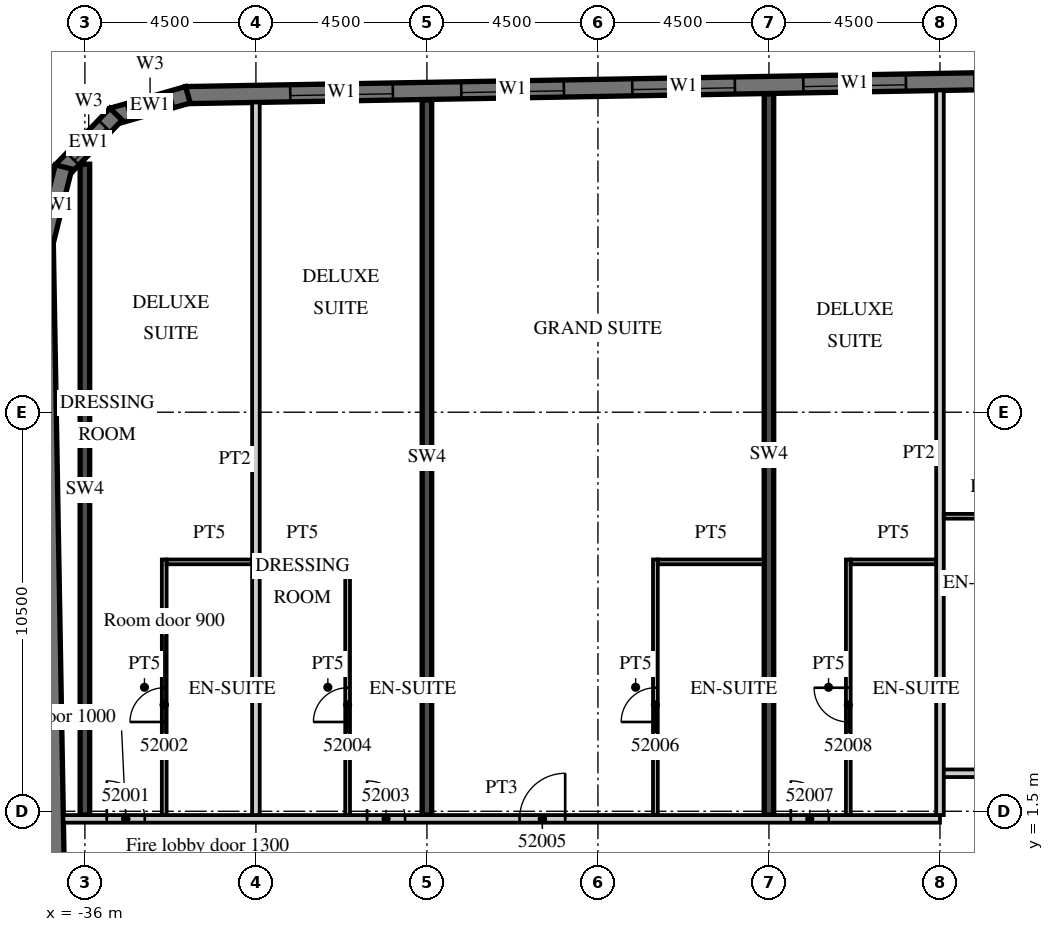
"""IFC4 building model, lengths in metres.
Left out: names, types, materials, properties, quantities, classifications, styles, units other than length and angle.
Written with IfcOpenShell. Run it as: python <this file> out.ifc"""

import sys

from ifc_helpers import new_model, si_unit, direction, frame, frame_2d, origin, place, context, subcontext, project, spatial, polyline, rectangle, outline, extrude, element, fill, save


model = new_model("IFC4")
c1 = context("Model", 3, precision=1e-05, world=origin(), true_north=direction((0.0, 1.0)))
c2 = subcontext(c1, "Body", "Model", "MODEL_VIEW")
j1 = project(units=[si_unit("LENGTHUNIT", "METRE"), si_unit("PLANEANGLEUNIT", "RADIAN")], contexts=[c1])
p1 = place(None, origin())
s1 = spatial("IfcSite", under=j1, at=p1, CompositionType="ELEMENT")
p2 = place(p1, origin())
s2 = spatial("IfcBuilding", under=s1, at=p2, CompositionType="ELEMENT")
p3 = place(p2, frame((0.0, 0.0, 217.7)))
s3 = spatial("IfcBuildingStorey", under=s2, at=p3, CompositionType="ELEMENT", Elevation=217.7)
p4 = place(p3, frame((-36.0, 1.4, 0.0), z_axis=(0.0, 0.0, 1.0), x_axis=(0.0, 1.0, 0.0)))
e1 = element("IfcWall", 1, at=p4, inside=s3, PredefinedType="SHEAR", context=c2, shape_type="SweptSolid", body=[
    extrude(rectangle(XDim=17.125, YDim=0.25, at=frame_2d((8.563, 0.0))), origin(), (0.0, 0.0, 1.0), 3.3),
])
p5 = place(p3, frame((-27.0, 1.4, 0.0), z_axis=(0.0, 0.0, 1.0), x_axis=(0.0, 1.0, 0.0)))
e2 = element("IfcWall", 2, at=p5, inside=s3, PredefinedType="SHEAR", context=c2, shape_type="SweptSolid", body=[
    extrude(rectangle(XDim=18.817, YDim=0.25, at=frame_2d((9.409, 0.0))), origin(), (0.0, 0.0, 1.0), 3.3),
])
p6 = place(p3, frame((-18.0, 1.4, 0.0), z_axis=(0.0, 0.0, 1.0), x_axis=(0.0, 1.0, 0.0)))
e3 = element("IfcWall", 3, at=p6, inside=s3, PredefinedType="SHEAR", context=c2, shape_type="SweptSolid", body=[
    extrude(rectangle(XDim=18.974, YDim=0.25, at=frame_2d((9.487, 0.0))), origin(), (0.0, 0.0, 1.0), 3.3),
])
p7 = place(p3, frame((-37.057, 16.503, 0.0), z_axis=(0.0, 0.0, 1.0), x_axis=(0.017452279857, -0.999847697366, 0.0)))
e4 = element("IfcWall", 4, at=p7, inside=s3, PredefinedType="SOLIDWALL", context=c2, shape_type="SweptSolid", body=[
    extrude(rectangle(XDim=33.0, YDim=0.45, at=frame_2d((16.5, 0.0))), origin(), (0.0, 0.0, 1.0), 3.02),
])
p8 = place(p3, frame((13.504, 21.161, 0.0), z_axis=(0.0, 0.0, 1.0), x_axis=(-0.999847763257, -0.017448504532, 0.0)))
e5 = element("IfcWall", 5, at=p8, inside=s3, PredefinedType="SOLIDWALL", context=c2, shape_type="SweptSolid", body=[
    extrude(rectangle(XDim=46.859, YDim=0.45, at=frame_2d((23.43, 0.0))), origin(), (0.0, 0.0, 1.0), 3.02),
])
p9 = place(p8, frame((0.9, 0.0, 0.45)))
e6 = element("IfcOpeningElement", 6, at=p9, cuts=e5, PredefinedType="OPENING", context=c2, shape_type="SweptSolid", body=[
    extrude(rectangle(XDim=2.7, YDim=2.25, at=frame_2d((1.35, 1.125))), frame((0.0, 0.235, 0.0), z_axis=(0.0, -1.0, 0.0), x_axis=(1.0, 0.0, 0.0)), (0.0, 0.0, 1.0), 0.47),
])
p10 = place(p8, frame((5.401, 0.0, 0.45)))
e7 = element("IfcOpeningElement", 7, at=p10, cuts=e5, PredefinedType="OPENING", context=c2, shape_type="SweptSolid", body=[
    extrude(rectangle(XDim=2.7, YDim=2.25, at=frame_2d((1.35, 1.125))), frame((0.0, 0.235, 0.0), z_axis=(0.0, -1.0, 0.0), x_axis=(1.0, 0.0, 0.0)), (0.0, 0.0, 1.0), 0.47),
])
p11 = place(p8, frame((9.902, 0.0, 0.45)))
e8 = element("IfcOpeningElement", 8, at=p11, cuts=e5, PredefinedType="OPENING", context=c2, shape_type="SweptSolid", body=[
    extrude(rectangle(XDim=2.7, YDim=2.25, at=frame_2d((1.35, 1.125))), frame((0.0, 0.235, 0.0), z_axis=(0.0, -1.0, 0.0), x_axis=(1.0, 0.0, 0.0)), (0.0, 0.0, 1.0), 0.47),
])
p12 = place(p8, frame((14.402, 0.0, 0.45)))
e9 = element("IfcOpeningElement", 9, at=p12, cuts=e5, PredefinedType="OPENING", context=c2, shape_type="SweptSolid", body=[
    extrude(rectangle(XDim=2.7, YDim=2.25, at=frame_2d((1.35, 1.125))), frame((0.0, 0.235, 0.0), z_axis=(0.0, -1.0, 0.0), x_axis=(1.0, 0.0, 0.0)), (0.0, 0.0, 1.0), 0.47),
])
p13 = place(p8, frame((18.903, 0.0, 0.45)))
e10 = element("IfcOpeningElement", 10, at=p13, cuts=e5, PredefinedType="OPENING", context=c2, shape_type="SweptSolid", body=[
    extrude(rectangle(XDim=2.7, YDim=2.25, at=frame_2d((1.35, 1.125))), frame((0.0, 0.235, 0.0), z_axis=(0.0, -1.0, 0.0), x_axis=(1.0, 0.0, 0.0)), (0.0, 0.0, 1.0), 0.47),
])
p14 = place(p8, frame((23.404, 0.0, 0.45)))
e11 = element("IfcOpeningElement", 11, at=p14, cuts=e5, PredefinedType="OPENING", context=c2, shape_type="SweptSolid", body=[
    extrude(rectangle(XDim=2.7, YDim=2.25, at=frame_2d((1.35, 1.125))), frame((0.0, 0.235, 0.0), z_axis=(0.0, -1.0, 0.0), x_axis=(1.0, 0.0, 0.0)), (0.0, 0.0, 1.0), 0.47),
])
p15 = place(p8, frame((27.904, 0.0, 0.45)))
e12 = element("IfcOpeningElement", 12, at=p15, cuts=e5, PredefinedType="OPENING", context=c2, shape_type="SweptSolid", body=[
    extrude(rectangle(XDim=2.7, YDim=2.25, at=frame_2d((1.35, 1.125))), frame((0.0, 0.235, 0.0), z_axis=(0.0, -1.0, 0.0), x_axis=(1.0, 0.0, 0.0)), (0.0, 0.0, 1.0), 0.47),
])
p16 = place(p8, frame((32.405, 0.0, 0.45)))
e13 = element("IfcOpeningElement", 13, at=p16, cuts=e5, PredefinedType="OPENING", context=c2, shape_type="SweptSolid", body=[
    extrude(rectangle(XDim=2.7, YDim=2.25, at=frame_2d((1.35, 1.125))), frame((0.0, 0.235, 0.0), z_axis=(0.0, -1.0, 0.0), x_axis=(1.0, 0.0, 0.0)), (0.0, 0.0, 1.0), 0.47),
])
p17 = place(p8, frame((36.906, 0.0, 0.45)))
e14 = element("IfcOpeningElement", 14, at=p17, cuts=e5, PredefinedType="OPENING", context=c2, shape_type="SweptSolid", body=[
    extrude(rectangle(XDim=2.7, YDim=2.25, at=frame_2d((1.35, 1.125))), frame((0.0, 0.235, 0.0), z_axis=(0.0, -1.0, 0.0), x_axis=(1.0, 0.0, 0.0)), (0.0, 0.0, 1.0), 0.47),
])
p18 = place(p8, frame((41.406, 0.0, 0.45)))
e15 = element("IfcOpeningElement", 15, at=p18, cuts=e5, PredefinedType="OPENING", context=c2, shape_type="SweptSolid", body=[
    extrude(rectangle(XDim=2.7, YDim=2.25, at=frame_2d((1.35, 1.125))), frame((0.0, 0.235, 0.0), z_axis=(0.0, -1.0, 0.0), x_axis=(1.0, 0.0, 0.0)), (0.0, 0.0, 1.0), 0.47),
])
p19 = place(p3, frame((-33.29, 20.352, 0.0), z_axis=(0.0, 0.0, 1.0), x_axis=(-0.961247584925, -0.275686562016, 0.0)))
e16 = element("IfcWall", 16, at=p19, inside=s3, PredefinedType="SOLIDWALL", context=c2, shape_type="SweptSolid", body=[
    extrude(outline(polyline([(0.0, -0.225), (2.071, -0.225), (1.95, 0.225), (0.121, 0.225), (0.0, -0.225)])), origin(), (0.0, 0.0, 1.0), 3.02),
])
p20 = place(p19, frame((0.435, 0.0, 0.45)))
e17 = element("IfcOpeningElement", 17, at=p20, cuts=e16, PredefinedType="OPENING", context=c2, shape_type="SweptSolid", body=[
    extrude(rectangle(XDim=1.2, YDim=2.25, at=frame_2d((0.6, 1.125))), frame((0.0, 0.235, 0.0), z_axis=(0.0, -1.0, 0.0), x_axis=(1.0, 0.0, 0.0)), (0.0, 0.0, 1.0), 0.47),
])
p21 = place(p3, frame((-35.181, 19.842, 0.0), z_axis=(0.0, 0.0, 1.0), x_axis=(-0.694678672846, -0.719320193998, 0.0)))
e18 = element("IfcWall", 18, at=p21, inside=s3, PredefinedType="SOLIDWALL", context=c2, shape_type="SweptSolid", body=[
    extrude(outline(polyline([(0.0, -0.225), (2.071, -0.225), (1.95, 0.225), (0.121, 0.225), (0.0, -0.225)])), origin(), (0.0, 0.0, 1.0), 3.02),
])
p22 = place(p21, frame((0.435, 0.0, 0.45)))
e19 = element("IfcOpeningElement", 19, at=p22, cuts=e18, PredefinedType="OPENING", context=c2, shape_type="SweptSolid", body=[
    extrude(rectangle(XDim=1.2, YDim=2.25, at=frame_2d((0.6, 1.125))), frame((0.0, 0.235, 0.0), z_axis=(0.0, -1.0, 0.0), x_axis=(1.0, 0.0, 0.0)), (0.0, 0.0, 1.0), 0.47),
])
p23 = place(p3, frame((-36.563, 18.454, 0.0), z_axis=(0.0, 0.0, 1.0), x_axis=(-0.241869623482, -0.970308757683, 0.0)))
e20 = element("IfcWall", 20, at=p23, inside=s3, PredefinedType="SOLIDWALL", context=c2, shape_type="SweptSolid", body=[
    extrude(outline(polyline([(-0.0, -0.225), (2.07, -0.225), (1.95, 0.225), (0.12, 0.225), (-0.0, -0.225)])), origin(), (0.0, 0.0, 1.0), 3.02),
])
p24 = place(p3, frame((-36.566, 1.3, 0.0), z_axis=(0.0, 0.0, 1.0), x_axis=(1.0, 0.0, 0.0)))
e21 = element("IfcWall", 21, at=p24, inside=s3, PredefinedType="PARTITIONING", context=c2, shape_type="SweptSolid", body=[
    extrude(rectangle(XDim=23.066, YDim=0.2, at=frame_2d((11.533, 0.0))), origin(), (0.0, 0.0, 1.0), 3.02),
])
p25 = place(p24, frame((1.141, 0.0, 0.0)))
e22 = element("IfcOpeningElement", 22, at=p25, cuts=e21, PredefinedType="OPENING", context=c2, shape_type="SweptSolid", body=[
    extrude(rectangle(XDim=1.0, YDim=2.1, at=frame_2d((0.5, 1.05))), frame((0.0, 0.11, 0.0), z_axis=(0.0, -1.0, 0.0), x_axis=(1.0, 0.0, 0.0)), (0.0, 0.0, 1.0), 0.22),
])
p26 = place(p24, frame((7.991, 0.0, 0.0)))
e23 = element("IfcOpeningElement", 23, at=p26, cuts=e21, PredefinedType="OPENING", context=c2, shape_type="SweptSolid", body=[
    extrude(rectangle(XDim=1.0, YDim=2.1, at=frame_2d((0.5, 1.05))), frame((0.0, 0.11, 0.0), z_axis=(0.0, -1.0, 0.0), x_axis=(1.0, 0.0, 0.0)), (0.0, 0.0, 1.0), 0.22),
])
p27 = place(p24, frame((12.004, 0.0, 0.0)))
e24 = element("IfcOpeningElement", 24, at=p27, cuts=e21, PredefinedType="OPENING", context=c2, shape_type="SweptSolid", body=[
    extrude(rectangle(XDim=1.2, YDim=2.1, at=frame_2d((0.6, 1.05))), frame((0.0, 0.11, 0.0), z_axis=(0.0, -1.0, 0.0), x_axis=(1.0, 0.0, 0.0)), (0.0, 0.0, 1.0), 0.22),
])
p28 = place(p24, frame((19.141, 0.0, 0.0)))
e25 = element("IfcOpeningElement", 25, at=p28, cuts=e21, PredefinedType="OPENING", context=c2, shape_type="SweptSolid", body=[
    extrude(rectangle(XDim=1.0, YDim=2.1, at=frame_2d((0.5, 1.05))), frame((0.0, 0.11, 0.0), z_axis=(0.0, -1.0, 0.0), x_axis=(1.0, 0.0, 0.0)), (0.0, 0.0, 1.0), 0.22),
])
p29 = place(p3, frame((-13.5, 2.5, 0.0), z_axis=(0.0, 0.0, 1.0), x_axis=(1.0, 0.0, 0.0)))
e26 = element("IfcWall", 26, at=p29, inside=s3, PredefinedType="PARTITIONING", context=c2, shape_type="SweptSolid", body=[
    extrude(rectangle(XDim=27.0, YDim=0.2, at=frame_2d((13.5, 0.0))), origin(), (0.0, 0.0, 1.0), 3.02),
])
p30 = place(p29, frame((2.925, 0.0, 0.0)))
e27 = element("IfcOpeningElement", 27, at=p30, cuts=e26, PredefinedType="OPENING", context=c2, shape_type="SweptSolid", body=[
    extrude(rectangle(XDim=1.0, YDim=2.1, at=frame_2d((0.5, 1.05))), frame((0.0, 0.11, 0.0), z_axis=(0.0, -1.0, 0.0), x_axis=(1.0, 0.0, 0.0)), (0.0, 0.0, 1.0), 0.22),
])
p31 = place(p29, frame((7.45, 0.0, 0.0)))
e28 = element("IfcOpeningElement", 28, at=p31, cuts=e26, PredefinedType="OPENING", context=c2, shape_type="SweptSolid", body=[
    extrude(rectangle(XDim=1.0, YDim=2.1, at=frame_2d((0.5, 1.05))), frame((0.0, 0.11, 0.0), z_axis=(0.0, -1.0, 0.0), x_axis=(1.0, 0.0, 0.0)), (0.0, 0.0, 1.0), 0.22),
])
p32 = place(p29, frame((11.925, 0.0, 0.0)))
e29 = element("IfcOpeningElement", 29, at=p32, cuts=e26, PredefinedType="OPENING", context=c2, shape_type="SweptSolid", body=[
    extrude(rectangle(XDim=1.0, YDim=2.1, at=frame_2d((0.5, 1.05))), frame((0.0, 0.11, 0.0), z_axis=(0.0, -1.0, 0.0), x_axis=(1.0, 0.0, 0.0)), (0.0, 0.0, 1.0), 0.22),
])
p33 = place(p29, frame((14.075, 0.0, 0.0)))
e30 = element("IfcOpeningElement", 30, at=p33, cuts=e26, PredefinedType="OPENING", context=c2, shape_type="SweptSolid", body=[
    extrude(rectangle(XDim=1.0, YDim=2.1, at=frame_2d((0.5, 1.05))), frame((0.0, 0.11, 0.0), z_axis=(0.0, -1.0, 0.0), x_axis=(1.0, 0.0, 0.0)), (0.0, 0.0, 1.0), 0.22),
])
p34 = place(p29, frame((20.925, 0.0, 0.0)))
e31 = element("IfcOpeningElement", 31, at=p34, cuts=e26, PredefinedType="OPENING", context=c2, shape_type="SweptSolid", body=[
    extrude(rectangle(XDim=1.0, YDim=2.1, at=frame_2d((0.5, 1.05))), frame((0.0, 0.11, 0.0), z_axis=(0.0, -1.0, 0.0), x_axis=(1.0, 0.0, 0.0)), (0.0, 0.0, 1.0), 0.22),
])
p35 = place(p29, frame((25.425, 0.0, 0.0)))
e32 = element("IfcOpeningElement", 32, at=p35, cuts=e26, PredefinedType="OPENING", context=c2, shape_type="SweptSolid", body=[
    extrude(rectangle(XDim=1.0, YDim=2.1, at=frame_2d((0.5, 1.05))), frame((0.0, 0.11, 0.0), z_axis=(0.0, -1.0, 0.0), x_axis=(1.0, 0.0, 0.0)), (0.0, 0.0, 1.0), 0.22),
])
p36 = place(p3, frame((-31.5, 1.4, 0.0), z_axis=(0.0, 0.0, 1.0), x_axis=(0.0, 1.0, 0.0)))
e33 = element("IfcWall", 33, at=p36, inside=s3, PredefinedType="PARTITIONING", context=c2, shape_type="SweptSolid", body=[
    extrude(rectangle(XDim=18.751, YDim=0.2, at=frame_2d((9.375, 0.0))), origin(), (0.0, 0.0, 1.0), 3.02),
])
p37 = place(p3, frame((-33.913, 1.4, 0.0), z_axis=(0.0, 0.0, 1.0), x_axis=(0.0, 1.0, 0.0)))
e34 = element("IfcWall", 34, at=p37, inside=s3, PredefinedType="PARTITIONING", context=c2, shape_type="SweptSolid", body=[
    extrude(rectangle(XDim=6.725, YDim=0.125, at=frame_2d((3.363, 0.0))), origin(), (0.0, 0.0, 1.0), 3.02),
])
p38 = place(p37, frame((2.45, 0.0, 0.0)))
e35 = element("IfcOpeningElement", 35, at=p38, cuts=e34, PredefinedType="OPENING", context=c2, shape_type="SweptSolid", body=[
    extrude(rectangle(XDim=0.9, YDim=2.1, at=frame_2d((0.45, 1.05))), frame((0.0, 0.073, 0.0), z_axis=(0.0, -1.0, 0.0), x_axis=(1.0, 0.0, 0.0)), (0.0, 0.0, 1.0), 0.145),
])
p39 = place(p3, frame((-33.85, 8.062, 0.0), z_axis=(0.0, 0.0, 1.0), x_axis=(1.0, 0.0, 0.0)))
e36 = element("IfcWall", 36, at=p39, inside=s3, PredefinedType="PARTITIONING", context=c2, shape_type="SweptSolid", body=[
    extrude(rectangle(XDim=2.25, YDim=0.125, at=frame_2d((1.125, 0.0))), origin(), (0.0, 0.0, 1.0), 3.02),
])
p40 = place(p3, frame((-29.087, 1.4, 0.0), z_axis=(0.0, 0.0, 1.0), x_axis=(0.0, 1.0, 0.0)))
e37 = element("IfcWall", 37, at=p40, inside=s3, PredefinedType="PARTITIONING", context=c2, shape_type="SweptSolid", body=[
    extrude(rectangle(XDim=6.725, YDim=0.125, at=frame_2d((3.363, 0.0))), origin(), (0.0, 0.0, 1.0), 3.02),
])
p41 = place(p40, frame((2.45, 0.0, 0.0)))
e38 = element("IfcOpeningElement", 38, at=p41, cuts=e37, PredefinedType="OPENING", context=c2, shape_type="SweptSolid", body=[
    extrude(rectangle(XDim=0.9, YDim=2.1, at=frame_2d((0.45, 1.05))), frame((0.0, 0.073, 0.0), z_axis=(0.0, -1.0, 0.0), x_axis=(1.0, 0.0, 0.0)), (0.0, 0.0, 1.0), 0.145),
])
p42 = place(p3, frame((-31.4, 8.062, 0.0), z_axis=(0.0, 0.0, 1.0), x_axis=(1.0, 0.0, 0.0)))
e39 = element("IfcWall", 39, at=p42, inside=s3, PredefinedType="PARTITIONING", context=c2, shape_type="SweptSolid", body=[
    extrude(rectangle(XDim=2.25, YDim=0.125, at=frame_2d((1.125, 0.0))), origin(), (0.0, 0.0, 1.0), 3.02),
])
p43 = place(p3, frame((-20.988, 1.4, 0.0), z_axis=(0.0, 0.0, 1.0), x_axis=(0.0, 1.0, 0.0)))
e40 = element("IfcWall", 40, at=p43, inside=s3, PredefinedType="PARTITIONING", context=c2, shape_type="SweptSolid", body=[
    extrude(rectangle(XDim=6.725, YDim=0.125, at=frame_2d((3.363, 0.0))), origin(), (0.0, 0.0, 1.0), 3.02),
])
p44 = place(p43, frame((2.45, 0.0, 0.0)))
e41 = element("IfcOpeningElement", 41, at=p44, cuts=e40, PredefinedType="OPENING", context=c2, shape_type="SweptSolid", body=[
    extrude(rectangle(XDim=0.9, YDim=2.1, at=frame_2d((0.45, 1.05))), frame((0.0, 0.073, 0.0), z_axis=(0.0, -1.0, 0.0), x_axis=(1.0, 0.0, 0.0)), (0.0, 0.0, 1.0), 0.145),
])
p45 = place(p3, frame((-20.925, 8.062, 0.0), z_axis=(0.0, 0.0, 1.0), x_axis=(1.0, 0.0, 0.0)))
e42 = element("IfcWall", 42, at=p45, inside=s3, PredefinedType="PARTITIONING", context=c2, shape_type="SweptSolid", body=[
    extrude(rectangle(XDim=2.8, YDim=0.125, at=frame_2d((1.4, 0.0))), origin(), (0.0, 0.0, 1.0), 3.02),
])
p46 = place(p3, frame((-13.5, 1.4, 0.0), z_axis=(0.0, 0.0, 1.0), x_axis=(0.0, 1.0, 0.0)))
e43 = element("IfcWall", 43, at=p46, inside=s3, PredefinedType="PARTITIONING", context=c2, shape_type="SweptSolid", body=[
    extrude(rectangle(XDim=19.065, YDim=0.2, at=frame_2d((9.533, 0.0))), origin(), (0.0, 0.0, 1.0), 3.02),
])
p47 = place(p3, frame((-15.912, 1.4, 0.0), z_axis=(0.0, 0.0, 1.0), x_axis=(0.0, 1.0, 0.0)))
e44 = element("IfcWall", 44, at=p47, inside=s3, PredefinedType="PARTITIONING", context=c2, shape_type="SweptSolid", body=[
    extrude(rectangle(XDim=6.725, YDim=0.125, at=frame_2d((3.363, 0.0))), origin(), (0.0, 0.0, 1.0), 3.02),
])
p48 = place(p47, frame((2.45, 0.0, 0.0)))
e45 = element("IfcOpeningElement", 45, at=p48, cuts=e44, PredefinedType="OPENING", context=c2, shape_type="SweptSolid", body=[
    extrude(rectangle(XDim=0.9, YDim=2.1, at=frame_2d((0.45, 1.05))), frame((0.0, 0.073, 0.0), z_axis=(0.0, -1.0, 0.0), x_axis=(1.0, 0.0, 0.0)), (0.0, 0.0, 1.0), 0.145),
])
for number, where, z_axis, x_axis in (
    (46, (-15.85, 8.062, 0.0), (0.0, 0.0, 1.0), (1.0, 0.0, 0.0)),
    (47, (-13.4, 9.262, 0.0), (0.0, 0.0, 1.0), (1.0, 0.0, 0.0)),
):
    element("IfcWall", number, at=place(p3, frame(where, z_axis=z_axis, x_axis=x_axis)), inside=s3, PredefinedType="PARTITIONING", context=c2, shape_type="SweptSolid", body=[
        extrude(rectangle(XDim=2.25, YDim=0.125, at=frame_2d((1.125, 0.0))), origin(), (0.0, 0.0, 1.0), 3.02),
    ])
p49 = place(p15, origin())
e48 = element("IfcWindow", 48, at=p49, inside=s3, PartitioningType="SINGLE_PANEL", PredefinedType="WINDOW", context=c2, shape_type="SweptSolid", body=[
    extrude(rectangle(XDim=2.7, YDim=2.25, at=frame_2d((1.35, 1.125))), frame((0.0, 0.09, 0.0), z_axis=(0.0, -1.0, 0.0), x_axis=(1.0, 0.0, 0.0)), (0.0, 0.0, 1.0), 0.06),
])
fill(e12, e48)
p50 = place(p16, origin())
e49 = element("IfcWindow", 49, at=p50, inside=s3, PartitioningType="SINGLE_PANEL", PredefinedType="WINDOW", context=c2, shape_type="SweptSolid", body=[
    extrude(rectangle(XDim=2.7, YDim=2.25, at=frame_2d((1.35, 1.125))), frame((0.0, 0.09, 0.0), z_axis=(0.0, -1.0, 0.0), x_axis=(1.0, 0.0, 0.0)), (0.0, 0.0, 1.0), 0.06),
])
fill(e13, e49)
p51 = place(p17, origin())
e50 = element("IfcWindow", 50, at=p51, inside=s3, PartitioningType="SINGLE_PANEL", PredefinedType="WINDOW", context=c2, shape_type="SweptSolid", body=[
    extrude(rectangle(XDim=2.7, YDim=2.25, at=frame_2d((1.35, 1.125))), frame((0.0, 0.09, 0.0), z_axis=(0.0, -1.0, 0.0), x_axis=(1.0, 0.0, 0.0)), (0.0, 0.0, 1.0), 0.06),
])
fill(e14, e50)
p52 = place(p18, origin())
e51 = element("IfcWindow", 51, at=p52, inside=s3, PartitioningType="SINGLE_PANEL", PredefinedType="WINDOW", context=c2, shape_type="SweptSolid", body=[
    extrude(rectangle(XDim=2.7, YDim=2.25, at=frame_2d((1.35, 1.125))), frame((0.0, 0.09, 0.0), z_axis=(0.0, -1.0, 0.0), x_axis=(1.0, 0.0, 0.0)), (0.0, 0.0, 1.0), 0.06),
])
fill(e15, e51)
p53 = place(p20, origin())
e52 = element("IfcWindow", 52, at=p53, inside=s3, PartitioningType="SINGLE_PANEL", PredefinedType="WINDOW", context=c2, shape_type="SweptSolid", body=[
    extrude(rectangle(XDim=1.2, YDim=2.25, at=frame_2d((0.6, 1.125))), frame((0.0, 0.09, 0.0), z_axis=(0.0, -1.0, 0.0), x_axis=(1.0, 0.0, 0.0)), (0.0, 0.0, 1.0), 0.06),
])
fill(e17, e52)
p54 = place(p22, origin())
e53 = element("IfcWindow", 53, at=p54, inside=s3, PartitioningType="SINGLE_PANEL", PredefinedType="WINDOW", context=c2, shape_type="SweptSolid", body=[
    extrude(rectangle(XDim=1.2, YDim=2.25, at=frame_2d((0.6, 1.125))), frame((0.0, 0.09, 0.0), z_axis=(0.0, -1.0, 0.0), x_axis=(1.0, 0.0, 0.0)), (0.0, 0.0, 1.0), 0.06),
])
fill(e19, e53)
p55 = place(p25, origin())
e54 = element("IfcDoor", 54, at=p55, inside=s3, OperationType="SINGLE_SWING_LEFT", PredefinedType="DOOR", context=c2, shape_type="SweptSolid", body=[
    extrude(rectangle(XDim=1.0, YDim=2.1, at=frame_2d((0.5, 1.05))), frame((0.0, 0.025, 0.0), z_axis=(0.0, -1.0, 0.0), x_axis=(1.0, 0.0, 0.0)), (0.0, 0.0, 1.0), 0.05),
])
fill(e22, e54)
p56 = place(p38, origin())
e55 = element("IfcDoor", 55, at=p56, inside=s3, OperationType="SINGLE_SWING_LEFT", PredefinedType="DOOR", context=c2, shape_type="SweptSolid", body=[
    extrude(rectangle(XDim=0.9, YDim=2.1, at=frame_2d((0.45, 1.05))), frame((0.0, 0.025, 0.0), z_axis=(0.0, -1.0, 0.0), x_axis=(1.0, 0.0, 0.0)), (0.0, 0.0, 1.0), 0.05),
])
fill(e35, e55)
p57 = place(p26, origin())
e56 = element("IfcDoor", 56, at=p57, inside=s3, OperationType="SINGLE_SWING_LEFT", PredefinedType="DOOR", context=c2, shape_type="SweptSolid", body=[
    extrude(rectangle(XDim=1.0, YDim=2.1, at=frame_2d((0.5, 1.05))), frame((0.0, 0.025, 0.0), z_axis=(0.0, -1.0, 0.0), x_axis=(1.0, 0.0, 0.0)), (0.0, 0.0, 1.0), 0.05),
])
fill(e23, e56)
p58 = place(p41, origin())
e57 = element("IfcDoor", 57, at=p58, inside=s3, OperationType="SINGLE_SWING_LEFT", PredefinedType="DOOR", context=c2, shape_type="SweptSolid", body=[
    extrude(rectangle(XDim=0.9, YDim=2.1, at=frame_2d((0.45, 1.05))), frame((0.0, 0.025, 0.0), z_axis=(0.0, -1.0, 0.0), x_axis=(1.0, 0.0, 0.0)), (0.0, 0.0, 1.0), 0.05),
])
fill(e38, e57)
p59 = place(p27, origin())
e58 = element("IfcDoor", 58, at=p59, inside=s3, OperationType="SINGLE_SWING_RIGHT", PredefinedType="DOOR", context=c2, shape_type="SweptSolid", body=[
    extrude(rectangle(XDim=1.2, YDim=2.1, at=frame_2d((0.6, 1.05))), frame((0.0, 0.025, 0.0), z_axis=(0.0, -1.0, 0.0), x_axis=(1.0, 0.0, 0.0)), (0.0, 0.0, 1.0), 0.05),
])
fill(e24, e58)
p60 = place(p44, origin())
e59 = element("IfcDoor", 59, at=p60, inside=s3, OperationType="SINGLE_SWING_LEFT", PredefinedType="DOOR", context=c2, shape_type="SweptSolid", body=[
    extrude(rectangle(XDim=0.9, YDim=2.1, at=frame_2d((0.45, 1.05))), frame((0.0, 0.025, 0.0), z_axis=(0.0, -1.0, 0.0), x_axis=(1.0, 0.0, 0.0)), (0.0, 0.0, 1.0), 0.05),
])
fill(e41, e59)
p61 = place(p28, origin())
e60 = element("IfcDoor", 60, at=p61, inside=s3, OperationType="SINGLE_SWING_LEFT", PredefinedType="DOOR", context=c2, shape_type="SweptSolid", body=[
    extrude(rectangle(XDim=1.0, YDim=2.1, at=frame_2d((0.5, 1.05))), frame((0.0, 0.025, 0.0), z_axis=(0.0, -1.0, 0.0), x_axis=(1.0, 0.0, 0.0)), (0.0, 0.0, 1.0), 0.05),
])
fill(e25, e60)
p62 = place(p48, origin())
e61 = element("IfcDoor", 61, at=p62, inside=s3, OperationType="SINGLE_SWING_RIGHT", PredefinedType="DOOR", context=c2, shape_type="SweptSolid", body=[
    extrude(rectangle(XDim=0.9, YDim=2.1, at=frame_2d((0.45, 1.05))), frame((0.0, 0.025, 0.0), z_axis=(0.0, -1.0, 0.0), x_axis=(1.0, 0.0, 0.0)), (0.0, 0.0, 1.0), 0.05),
])
fill(e45, e61)
save(model, sys.argv[1])
